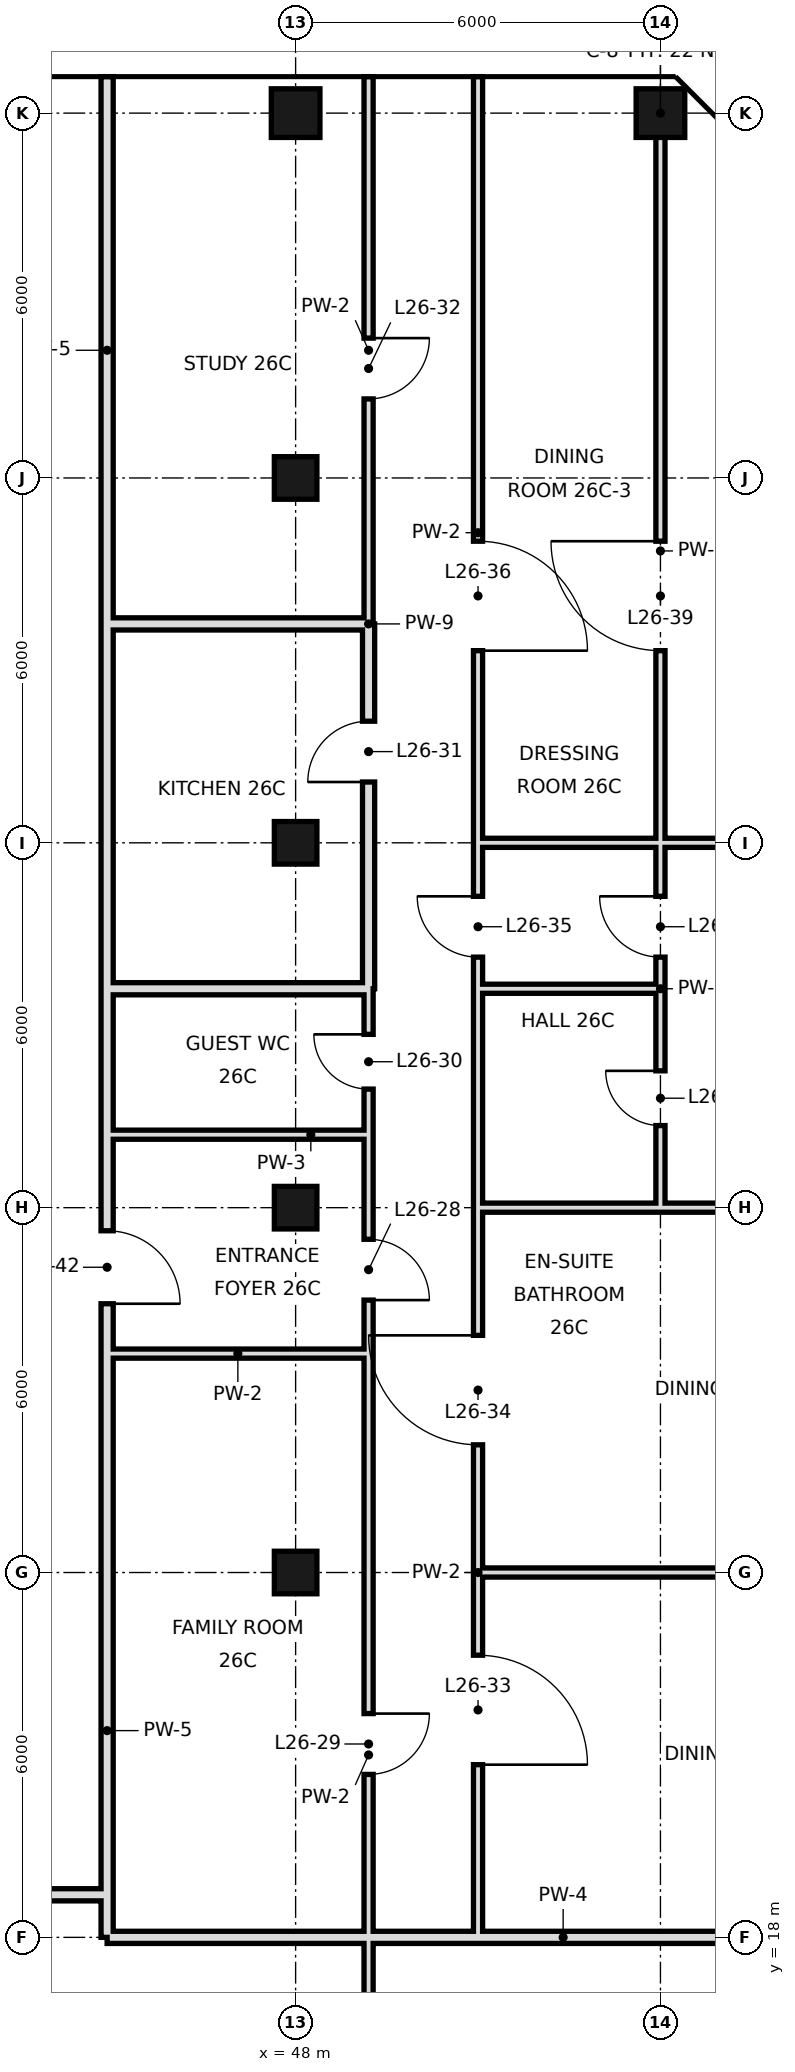
"""IFC4 building model, lengths in metres.
Left out: names, types, materials, properties, quantities, classifications, styles, units other than length and angle.
Written with IfcOpenShell. Run it as: python <this file> out.ifc"""

import sys

from ifc_helpers import new_model, si_unit, direction, frame, frame_2d, origin, origin_2d, place, context, subcontext, project, spatial, rectangle, hollow_rectangle, extrude, element, fill, save


model = new_model("IFC4")
c1 = context("Model", 3, precision=1e-05, world=origin(), true_north=direction((0.0, 1.0)))
c2 = subcontext(c1, "Body", "Model", "MODEL_VIEW")
j1 = project(units=[si_unit("LENGTHUNIT", "METRE"), si_unit("PLANEANGLEUNIT", "RADIAN")], contexts=[c1])
p1 = place(None, origin())
s1 = spatial("IfcSite", under=j1, at=p1, CompositionType="ELEMENT")
p2 = place(p1, origin())
s2 = spatial("IfcBuilding", under=s1, at=p2, CompositionType="ELEMENT")
p3 = place(p2, frame((0.0, 0.0, 119.6)))
s3 = spatial("IfcBuildingStorey", under=s2, at=p3, CompositionType="ELEMENT", Elevation=119.6)
for number, where, z_axis, x_axis in (
    (1, (48.0, 24.0, 0.0), (0.0, 0.0, 1.0), (1.0, 0.0, 0.0)),
    (2, (48.0, 30.0, 0.0), (0.0, 0.0, 1.0), (1.0, 0.0, 0.0)),
    (3, (48.0, 36.0, 0.0), (0.0, 0.0, 1.0), (1.0, 0.0, 0.0)),
    (4, (48.0, 42.0, 0.0), (0.0, 0.0, 1.0), (1.0, 0.0, 0.0)),
):
    element("IfcColumn", number, at=place(p3, frame(where, z_axis=z_axis, x_axis=x_axis)), inside=s3, PredefinedType="COLUMN", context=c2, shape_type="SweptSolid", body=[
        extrude(hollow_rectangle(XDim=0.7, YDim=0.7, WallThickness=0.036, at=origin_2d()), origin(), (0.0, 0.0, 1.0), 3.6),
    ])
for number, where, z_axis, x_axis in (
    (5, (48.0, 48.0, 0.0), (0.0, 0.0, 1.0), (1.0, 0.0, 0.0)),
    (6, (54.0, 48.0, 0.0), (0.0, 0.0, 1.0), (1.0, 0.0, 0.0)),
):
    element("IfcColumn", number, at=place(p3, frame(where, z_axis=z_axis, x_axis=x_axis)), inside=s3, PredefinedType="COLUMN", context=c2, shape_type="SweptSolid", body=[
        extrude(hollow_rectangle(XDim=0.8, YDim=0.8, WallThickness=0.04, at=origin_2d()), origin(), (0.0, 0.0, 1.0), 3.6),
    ])
p4 = place(p3, frame((44.9, 18.7, 0.0), z_axis=(0.0, 0.0, 1.0), x_axis=(0.0, 1.0, 0.0)))
e7 = element("IfcWall", 7, at=p4, inside=s3, PredefinedType="SOLIDWALL", context=c2, shape_type="SweptSolid", body=[
    extrude(rectangle(XDim=14.9, YDim=0.2, at=frame_2d((7.45, 0.0))), origin(), (0.0, 0.0, 1.0), 2.97),
])
p5 = place(p4, frame((9.72, 0.0, 0.0)))
e8 = element("IfcOpeningElement", 8, at=p5, cuts=e7, PredefinedType="OPENING", context=c2, shape_type="SweptSolid", body=[
    extrude(rectangle(XDim=1.2, YDim=2.4, at=frame_2d((0.6, 1.2))), frame((0.0, 0.11, 0.0), z_axis=(0.0, -1.0, 0.0), x_axis=(1.0, 0.0, 0.0)), (0.0, 0.0, 1.0), 0.22),
])
p6 = place(p3, frame((44.9, 39.6, 0.0), z_axis=(0.0, 0.0, 1.0), x_axis=(0.0, 1.0, 0.0)))
e9 = element("IfcWall", 9, at=p6, inside=s3, PredefinedType="SOLIDWALL", context=c2, shape_type="SweptSolid", body=[
    extrude(rectangle(XDim=9.0, YDim=0.2, at=frame_2d((4.5, 0.0))), origin(), (0.0, 0.0, 1.0), 2.72),
])
p7 = place(p3, frame((44.9, 33.6, 0.0), z_axis=(0.0, 0.0, 1.0), x_axis=(0.0, 1.0, 0.0)))
e10 = element("IfcWall", 10, at=p7, inside=s3, PredefinedType="SOLIDWALL", context=c2, shape_type="SweptSolid", body=[
    extrude(rectangle(XDim=6.0, YDim=0.2, at=frame_2d((3.0, 0.0))), origin(), (0.0, 0.0, 1.0), 3.42),
])
p8 = place(p3, frame((44.9, 18.0, 0.0), z_axis=(0.0, 0.0, 1.0), x_axis=(0.0, 1.0, 0.0)))
e11 = element("IfcWall", 11, at=p8, inside=s3, PredefinedType="SOLIDWALL", context=c2, shape_type="SweptSolid", body=[
    extrude(rectangle(XDim=0.7, YDim=0.2, at=frame_2d((0.35, 0.0))), origin(), (0.0, 0.0, 1.0), 2.97),
])
p9 = place(p3, frame((49.2, 33.6, 0.0), z_axis=(0.0, 0.0, 1.0), x_axis=(0.0, 1.0, 0.0)))
e12 = element("IfcWall", 12, at=p9, inside=s3, PredefinedType="SOLIDWALL", context=c2, shape_type="SweptSolid", body=[
    extrude(rectangle(XDim=6.0, YDim=0.2, at=frame_2d((3.0, 0.0))), origin(), (0.0, 0.0, 1.0), 2.72),
])
p10 = place(p9, frame((3.4, 0.0, 0.0)))
e13 = element("IfcOpeningElement", 13, at=p10, cuts=e12, PredefinedType="OPENING", context=c2, shape_type="SweptSolid", body=[
    extrude(rectangle(XDim=1.0, YDim=2.4, at=frame_2d((0.5, 1.2))), frame((0.0, 0.11, 0.0), z_axis=(0.0, -1.0, 0.0), x_axis=(1.0, 0.0, 0.0)), (0.0, 0.0, 1.0), 0.22),
])
p11 = place(p3, frame((49.2, 10.8, 0.0), z_axis=(0.0, 0.0, 1.0), x_axis=(0.0, 1.0, 0.0)))
e14 = element("IfcWall", 14, at=p11, inside=s3, PredefinedType="PARTITIONING", context=c2, shape_type="SweptSolid", body=[
    extrude(rectangle(XDim=20.4, YDim=0.15, at=frame_2d((10.2, 0.0))), origin(), (0.0, 0.0, 1.0), 3.42),
])
p12 = place(p11, frame((17.68, 0.0, 0.0)))
e15 = element("IfcOpeningElement", 15, at=p12, cuts=e14, PredefinedType="OPENING", context=c2, shape_type="SweptSolid", body=[
    extrude(rectangle(XDim=1.0, YDim=2.4, at=frame_2d((0.5, 1.2))), frame((0.0, 0.085, 0.0), z_axis=(0.0, -1.0, 0.0), x_axis=(1.0, 0.0, 0.0)), (0.0, 0.0, 1.0), 0.17),
])
p13 = place(p11, frame((9.88, 0.0, 0.0)))
e16 = element("IfcOpeningElement", 16, at=p13, cuts=e14, PredefinedType="OPENING", context=c2, shape_type="SweptSolid", body=[
    extrude(rectangle(XDim=1.0, YDim=2.4, at=frame_2d((0.5, 1.2))), frame((0.0, 0.085, 0.0), z_axis=(0.0, -1.0, 0.0), x_axis=(1.0, 0.0, 0.0)), (0.0, 0.0, 1.0), 0.17),
])
p14 = place(p3, frame((49.2, 39.6, 0.0), z_axis=(0.0, 0.0, 1.0), x_axis=(0.0, 1.0, 0.0)))
e17 = element("IfcWall", 17, at=p14, inside=s3, PredefinedType="PARTITIONING", context=c2, shape_type="SweptSolid", body=[
    extrude(rectangle(XDim=9.0, YDim=0.15, at=frame_2d((4.5, 0.0))), origin(), (0.0, 0.0, 1.0), 3.42),
])
p15 = place(p14, frame((3.7, 0.0, 0.0)))
e18 = element("IfcOpeningElement", 18, at=p15, cuts=e17, PredefinedType="OPENING", context=c2, shape_type="SweptSolid", body=[
    extrude(rectangle(XDim=1.0, YDim=2.4, at=frame_2d((0.5, 1.2))), frame((0.0, 0.085, 0.0), z_axis=(0.0, -1.0, 0.0), x_axis=(1.0, 0.0, 0.0)), (0.0, 0.0, 1.0), 0.17),
])
p16 = place(p3, frame((49.2, 31.2, 0.0), z_axis=(0.0, 0.0, 1.0), x_axis=(0.0, 1.0, 0.0)))
e19 = element("IfcWall", 19, at=p16, inside=s3, PredefinedType="PARTITIONING", context=c2, shape_type="SweptSolid", body=[
    extrude(rectangle(XDim=2.4, YDim=0.15, at=frame_2d((1.2, 0.0))), origin(), (0.0, 0.0, 1.0), 3.42),
])
p17 = place(p16, frame((0.75, 0.0, 0.0)))
e20 = element("IfcOpeningElement", 20, at=p17, cuts=e19, PredefinedType="OPENING", context=c2, shape_type="SweptSolid", body=[
    extrude(rectangle(XDim=0.9, YDim=2.4, at=frame_2d((0.45, 1.2))), frame((0.0, 0.085, 0.0), z_axis=(0.0, -1.0, 0.0), x_axis=(1.0, 0.0, 0.0)), (0.0, 0.0, 1.0), 0.17),
])
p18 = place(p3, frame((51.0, 18.0, 0.0), z_axis=(0.0, 0.0, 1.0), x_axis=(0.0, 1.0, 0.0)))
e21 = element("IfcWall", 21, at=p18, inside=s3, PredefinedType="PARTITIONING", context=c2, shape_type="SweptSolid", body=[
    extrude(rectangle(XDim=12.0, YDim=0.15, at=frame_2d((6.0, 0.0))), origin(), (0.0, 0.0, 1.0), 3.42),
])
p19 = place(p18, frame((2.84, 0.0, 0.0)))
e22 = element("IfcOpeningElement", 22, at=p19, cuts=e21, PredefinedType="OPENING", context=c2, shape_type="SweptSolid", body=[
    extrude(rectangle(XDim=1.8, YDim=2.4, at=frame_2d((0.9, 1.2))), frame((0.0, 0.085, 0.0), z_axis=(0.0, -1.0, 0.0), x_axis=(1.0, 0.0, 0.0)), (0.0, 0.0, 1.0), 0.17),
])
p20 = place(p18, frame((8.1, 0.0, 0.0)))
e23 = element("IfcOpeningElement", 23, at=p20, cuts=e21, PredefinedType="OPENING", context=c2, shape_type="SweptSolid", body=[
    extrude(rectangle(XDim=1.8, YDim=2.4, at=frame_2d((0.9, 1.2))), frame((0.0, 0.085, 0.0), z_axis=(0.0, -1.0, 0.0), x_axis=(1.0, 0.0, 0.0)), (0.0, 0.0, 1.0), 0.17),
])
p21 = place(p3, frame((51.0, 33.6, 0.0), z_axis=(0.0, 0.0, 1.0), x_axis=(0.0, 1.0, 0.0)))
e24 = element("IfcWall", 24, at=p21, inside=s3, PredefinedType="PARTITIONING", context=c2, shape_type="SweptSolid", body=[
    extrude(rectangle(XDim=15.0, YDim=0.15, at=frame_2d((7.5, 0.0))), origin(), (0.0, 0.0, 1.0), 3.42),
])
p22 = place(p21, frame((0.52, 0.0, 0.0)))
e25 = element("IfcOpeningElement", 25, at=p22, cuts=e24, PredefinedType="OPENING", context=c2, shape_type="SweptSolid", body=[
    extrude(rectangle(XDim=1.0, YDim=2.4, at=frame_2d((0.5, 1.2))), frame((0.0, 0.085, 0.0), z_axis=(0.0, -1.0, 0.0), x_axis=(1.0, 0.0, 0.0)), (0.0, 0.0, 1.0), 0.17),
])
p23 = place(p21, frame((5.56, 0.0, 0.0)))
e26 = element("IfcOpeningElement", 26, at=p23, cuts=e24, PredefinedType="OPENING", context=c2, shape_type="SweptSolid", body=[
    extrude(rectangle(XDim=1.8, YDim=2.4, at=frame_2d((0.9, 1.2))), frame((0.0, 0.085, 0.0), z_axis=(0.0, -1.0, 0.0), x_axis=(1.0, 0.0, 0.0)), (0.0, 0.0, 1.0), 0.17),
])
p24 = place(p3, frame((51.0, 30.0, 0.0), z_axis=(0.0, 0.0, 1.0), x_axis=(0.0, 1.0, 0.0)))
e27 = element("IfcWall", 27, at=p24, inside=s3, PredefinedType="PARTITIONING", context=c2, shape_type="SweptSolid", body=[
    extrude(rectangle(XDim=3.6, YDim=0.15, at=frame_2d((1.8, 0.0))), origin(), (0.0, 0.0, 1.0), 3.42),
])
p25 = place(p3, frame((54.0, 33.6, 0.0), z_axis=(0.0, 0.0, 1.0), x_axis=(0.0, 1.0, 0.0)))
e28 = element("IfcWall", 28, at=p25, inside=s3, PredefinedType="PARTITIONING", context=c2, shape_type="SweptSolid", body=[
    extrude(rectangle(XDim=14.4, YDim=0.15, at=frame_2d((7.2, 0.0))), origin(), (0.0, 0.0, 1.0), 3.42),
])
p26 = place(p25, frame((0.52, 0.0, 0.0)))
e29 = element("IfcOpeningElement", 29, at=p26, cuts=e28, PredefinedType="OPENING", context=c2, shape_type="SweptSolid", body=[
    extrude(rectangle(XDim=1.0, YDim=2.4, at=frame_2d((0.5, 1.2))), frame((0.0, 0.085, 0.0), z_axis=(0.0, -1.0, 0.0), x_axis=(1.0, 0.0, 0.0)), (0.0, 0.0, 1.0), 0.17),
])
p27 = place(p25, frame((5.56, 0.0, 0.0)))
e30 = element("IfcOpeningElement", 30, at=p27, cuts=e28, PredefinedType="OPENING", context=c2, shape_type="SweptSolid", body=[
    extrude(rectangle(XDim=1.8, YDim=2.4, at=frame_2d((0.9, 1.2))), frame((0.0, 0.085, 0.0), z_axis=(0.0, -1.0, 0.0), x_axis=(1.0, 0.0, 0.0)), (0.0, 0.0, 1.0), 0.17),
])
p28 = place(p3, frame((54.0, 30.0, 0.0), z_axis=(0.0, 0.0, 1.0), x_axis=(0.0, 1.0, 0.0)))
e31 = element("IfcWall", 31, at=p28, inside=s3, PredefinedType="PARTITIONING", context=c2, shape_type="SweptSolid", body=[
    extrude(rectangle(XDim=3.6, YDim=0.15, at=frame_2d((1.8, 0.0))), origin(), (0.0, 0.0, 1.0), 3.42),
])
p29 = place(p28, frame((1.35, 0.0, 0.0)))
e32 = element("IfcOpeningElement", 32, at=p29, cuts=e31, PredefinedType="OPENING", context=c2, shape_type="SweptSolid", body=[
    extrude(rectangle(XDim=0.9, YDim=2.4, at=frame_2d((0.45, 1.2))), frame((0.0, 0.085, 0.0), z_axis=(0.0, -1.0, 0.0), x_axis=(1.0, 0.0, 0.0)), (0.0, 0.0, 1.0), 0.17),
])
p30 = place(p3, frame((44.9, 18.0, 0.0), z_axis=(0.0, 0.0, 1.0), x_axis=(1.0, 0.0, 0.0)))
e33 = element("IfcWall", 33, at=p30, inside=s3, PredefinedType="SOLIDWALL", context=c2, shape_type="SweptSolid", body=[
    extrude(rectangle(XDim=15.7, YDim=0.2, at=frame_2d((7.85, 0.0))), origin(), (0.0, 0.0, 1.0), 2.72),
])
p31 = place(p3, frame((35.4, 18.7, 0.0), z_axis=(0.0, 0.0, 1.0), x_axis=(1.0, 0.0, 0.0)))
e34 = element("IfcWall", 34, at=p31, inside=s3, PredefinedType="SOLIDWALL", context=c2, shape_type="SweptSolid", body=[
    extrude(rectangle(XDim=9.5, YDim=0.2, at=frame_2d((4.75, 0.0))), origin(), (0.0, 0.0, 1.0), 2.72),
])
p32 = place(p3, frame((51.0, 24.0, 0.0), z_axis=(0.0, 0.0, 1.0), x_axis=(1.0, 0.0, 0.0)))
e35 = element("IfcWall", 35, at=p32, inside=s3, PredefinedType="PARTITIONING", context=c2, shape_type="SweptSolid", body=[
    extrude(rectangle(XDim=9.0, YDim=0.15, at=frame_2d((4.5, 0.0))), origin(), (0.0, 0.0, 1.0), 2.72),
])
p33 = place(p3, frame((44.9, 27.6, 0.0), z_axis=(0.0, 0.0, 1.0), x_axis=(1.0, 0.0, 0.0)))
e36 = element("IfcWall", 36, at=p33, inside=s3, PredefinedType="PARTITIONING", context=c2, shape_type="SweptSolid", body=[
    extrude(rectangle(XDim=4.3, YDim=0.15, at=frame_2d((2.15, 0.0))), origin(), (0.0, 0.0, 1.0), 3.42),
])
p34 = place(p3, frame((54.0, 30.0, 0.0), z_axis=(0.0, 0.0, 1.0), x_axis=(1.0, 0.0, 0.0)))
e37 = element("IfcWall", 37, at=p34, inside=s3, PredefinedType="PARTITIONING", context=c2, shape_type="SweptSolid", body=[
    extrude(rectangle(XDim=6.6, YDim=0.15, at=frame_2d((3.3, 0.0))), origin(), (0.0, 0.0, 1.0), 2.72),
])
p35 = place(p3, frame((51.0, 30.0, 0.0), z_axis=(0.0, 0.0, 1.0), x_axis=(1.0, 0.0, 0.0)))
e38 = element("IfcWall", 38, at=p35, inside=s3, PredefinedType="PARTITIONING", context=c2, shape_type="SweptSolid", body=[
    extrude(rectangle(XDim=3.0, YDim=0.15, at=frame_2d((1.5, 0.0))), origin(), (0.0, 0.0, 1.0), 2.72),
])
p36 = place(p3, frame((44.9, 31.2, 0.0), z_axis=(0.0, 0.0, 1.0), x_axis=(1.0, 0.0, 0.0)))
e39 = element("IfcWall", 39, at=p36, inside=s3, PredefinedType="PARTITIONING", context=c2, shape_type="SweptSolid", body=[
    extrude(rectangle(XDim=4.3, YDim=0.15, at=frame_2d((2.15, 0.0))), origin(), (0.0, 0.0, 1.0), 3.42),
])
p37 = place(p3, frame((44.9, 33.6, 0.0), z_axis=(0.0, 0.0, 1.0), x_axis=(1.0, 0.0, 0.0)))
e40 = element("IfcWall", 40, at=p37, inside=s3, PredefinedType="SOLIDWALL", context=c2, shape_type="SweptSolid", body=[
    extrude(rectangle(XDim=4.3, YDim=0.2, at=frame_2d((2.15, 0.0))), origin(), (0.0, 0.0, 1.0), 2.97),
])
p38 = place(p3, frame((51.0, 33.6, 0.0), z_axis=(0.0, 0.0, 1.0), x_axis=(1.0, 0.0, 0.0)))
e41 = element("IfcWall", 41, at=p38, inside=s3, PredefinedType="PARTITIONING", context=c2, shape_type="SweptSolid", body=[
    extrude(rectangle(XDim=3.0, YDim=0.15, at=frame_2d((1.5, 0.0))), origin(), (0.0, 0.0, 1.0), 3.42),
])
p39 = place(p3, frame((51.0, 36.0, 0.0), z_axis=(0.0, 0.0, 1.0), x_axis=(1.0, 0.0, 0.0)))
e42 = element("IfcWall", 42, at=p39, inside=s3, PredefinedType="PARTITIONING", context=c2, shape_type="SweptSolid", body=[
    extrude(rectangle(XDim=9.0, YDim=0.15, at=frame_2d((4.5, 0.0))), origin(), (0.0, 0.0, 1.0), 2.72),
])
p40 = place(p3, frame((44.9, 39.6, 0.0), z_axis=(0.0, 0.0, 1.0), x_axis=(1.0, 0.0, 0.0)))
e43 = element("IfcWall", 43, at=p40, inside=s3, PredefinedType="SOLIDWALL", context=c2, shape_type="SweptSolid", body=[
    extrude(rectangle(XDim=4.3, YDim=0.2, at=frame_2d((2.15, 0.0))), origin(), (0.0, 0.0, 1.0), 2.97),
])
p41 = place(p12, frame((1.0, 0.0, 0.0), z_axis=(0.0, 0.0, 1.0), x_axis=(-1.0, 0.0, 0.0)))
e44 = element("IfcDoor", 44, at=p41, inside=s3, OperationType="SINGLE_SWING_RIGHT", PredefinedType="DOOR", context=c2, shape_type="SweptSolid", body=[
    extrude(rectangle(XDim=1.0, YDim=2.4, at=frame_2d((0.5, 1.2))), frame((0.0, 0.025, 0.0), z_axis=(0.0, -1.0, 0.0), x_axis=(1.0, 0.0, 0.0)), (0.0, 0.0, 1.0), 0.05),
])
fill(e15, e44)
p42 = place(p13, origin())
e45 = element("IfcDoor", 45, at=p42, inside=s3, OperationType="SINGLE_SWING_RIGHT", PredefinedType="DOOR", context=c2, shape_type="SweptSolid", body=[
    extrude(rectangle(XDim=1.0, YDim=2.4, at=frame_2d((0.5, 1.2))), frame((0.0, 0.025, 0.0), z_axis=(0.0, -1.0, 0.0), x_axis=(1.0, 0.0, 0.0)), (0.0, 0.0, 1.0), 0.05),
])
fill(e16, e45)
p43 = place(p17, frame((0.9, 0.0, 0.0), z_axis=(0.0, 0.0, 1.0), x_axis=(-1.0, 0.0, 0.0)))
e46 = element("IfcDoor", 46, at=p43, inside=s3, OperationType="SINGLE_SWING_LEFT", PredefinedType="DOOR", context=c2, shape_type="SweptSolid", body=[
    extrude(rectangle(XDim=0.9, YDim=2.4, at=frame_2d((0.45, 1.2))), frame((0.0, 0.025, 0.0), z_axis=(0.0, -1.0, 0.0), x_axis=(1.0, 0.0, 0.0)), (0.0, 0.0, 1.0), 0.05),
])
fill(e20, e46)
p44 = place(p10, origin())
e47 = element("IfcDoor", 47, at=p44, inside=s3, OperationType="SINGLE_SWING_LEFT", PredefinedType="DOOR", context=c2, shape_type="SweptSolid", body=[
    extrude(rectangle(XDim=1.0, YDim=2.4, at=frame_2d((0.5, 1.2))), frame((0.0, 0.025, 0.0), z_axis=(0.0, -1.0, 0.0), x_axis=(1.0, 0.0, 0.0)), (0.0, 0.0, 1.0), 0.05),
])
fill(e13, e47)
p45 = place(p15, origin())
e48 = element("IfcDoor", 48, at=p45, inside=s3, OperationType="SINGLE_SWING_RIGHT", PredefinedType="DOOR", context=c2, shape_type="SweptSolid", body=[
    extrude(rectangle(XDim=1.0, YDim=2.4, at=frame_2d((0.5, 1.2))), frame((0.0, 0.025, 0.0), z_axis=(0.0, -1.0, 0.0), x_axis=(1.0, 0.0, 0.0)), (0.0, 0.0, 1.0), 0.05),
])
fill(e18, e48)
p46 = place(p19, frame((1.8, 0.0, 0.0), z_axis=(0.0, 0.0, 1.0), x_axis=(-1.0, 0.0, 0.0)))
e49 = element("IfcDoor", 49, at=p46, inside=s3, OperationType="SINGLE_SWING_RIGHT", PredefinedType="DOOR", context=c2, shape_type="SweptSolid", body=[
    extrude(rectangle(XDim=1.8, YDim=2.4, at=frame_2d((0.9, 1.2))), frame((0.0, 0.025, 0.0), z_axis=(0.0, -1.0, 0.0), x_axis=(1.0, 0.0, 0.0)), (0.0, 0.0, 1.0), 0.05),
])
fill(e22, e49)
p47 = place(p20, frame((1.8, 0.0, 0.0), z_axis=(0.0, 0.0, 1.0), x_axis=(-1.0, 0.0, 0.0)))
e50 = element("IfcDoor", 50, at=p47, inside=s3, OperationType="SINGLE_SWING_LEFT", PredefinedType="DOOR", context=c2, shape_type="SweptSolid", body=[
    extrude(rectangle(XDim=1.8, YDim=2.4, at=frame_2d((0.9, 1.2))), frame((0.0, 0.025, 0.0), z_axis=(0.0, -1.0, 0.0), x_axis=(1.0, 0.0, 0.0)), (0.0, 0.0, 1.0), 0.05),
])
fill(e23, e50)
p48 = place(p22, frame((1.0, 0.0, 0.0), z_axis=(0.0, 0.0, 1.0), x_axis=(-1.0, 0.0, 0.0)))
e51 = element("IfcDoor", 51, at=p48, inside=s3, OperationType="SINGLE_SWING_LEFT", PredefinedType="DOOR", context=c2, shape_type="SweptSolid", body=[
    extrude(rectangle(XDim=1.0, YDim=2.4, at=frame_2d((0.5, 1.2))), frame((0.0, 0.025, 0.0), z_axis=(0.0, -1.0, 0.0), x_axis=(1.0, 0.0, 0.0)), (0.0, 0.0, 1.0), 0.05),
])
fill(e25, e51)
p49 = place(p23, frame((1.8, 0.0, 0.0), z_axis=(0.0, 0.0, 1.0), x_axis=(-1.0, 0.0, 0.0)))
e52 = element("IfcDoor", 52, at=p49, inside=s3, OperationType="SINGLE_SWING_RIGHT", PredefinedType="DOOR", context=c2, shape_type="SweptSolid", body=[
    extrude(rectangle(XDim=1.8, YDim=2.4, at=frame_2d((0.9, 1.2))), frame((0.0, 0.025, 0.0), z_axis=(0.0, -1.0, 0.0), x_axis=(1.0, 0.0, 0.0)), (0.0, 0.0, 1.0), 0.05),
])
fill(e26, e52)
p50 = place(p26, frame((1.0, 0.0, 0.0), z_axis=(0.0, 0.0, 1.0), x_axis=(-1.0, 0.0, 0.0)))
e53 = element("IfcDoor", 53, at=p50, inside=s3, OperationType="SINGLE_SWING_LEFT", PredefinedType="DOOR", context=c2, shape_type="SweptSolid", body=[
    extrude(rectangle(XDim=1.0, YDim=2.4, at=frame_2d((0.5, 1.2))), frame((0.0, 0.025, 0.0), z_axis=(0.0, -1.0, 0.0), x_axis=(1.0, 0.0, 0.0)), (0.0, 0.0, 1.0), 0.05),
])
fill(e29, e53)
p51 = place(p29, frame((0.9, 0.0, 0.0), z_axis=(0.0, 0.0, 1.0), x_axis=(-1.0, 0.0, 0.0)))
e54 = element("IfcDoor", 54, at=p51, inside=s3, OperationType="SINGLE_SWING_LEFT", PredefinedType="DOOR", context=c2, shape_type="SweptSolid", body=[
    extrude(rectangle(XDim=0.9, YDim=2.4, at=frame_2d((0.45, 1.2))), frame((0.0, 0.025, 0.0), z_axis=(0.0, -1.0, 0.0), x_axis=(1.0, 0.0, 0.0)), (0.0, 0.0, 1.0), 0.05),
])
fill(e32, e54)
p52 = place(p27, frame((1.8, 0.0, 0.0), z_axis=(0.0, 0.0, 1.0), x_axis=(-1.0, 0.0, 0.0)))
e55 = element("IfcDoor", 55, at=p52, inside=s3, OperationType="SINGLE_SWING_LEFT", PredefinedType="DOOR", context=c2, shape_type="SweptSolid", body=[
    extrude(rectangle(XDim=1.8, YDim=2.4, at=frame_2d((0.9, 1.2))), frame((0.0, 0.025, 0.0), z_axis=(0.0, -1.0, 0.0), x_axis=(1.0, 0.0, 0.0)), (0.0, 0.0, 1.0), 0.05),
])
fill(e30, e55)
p53 = place(p5, frame((1.2, 0.0, 0.0), z_axis=(0.0, 0.0, 1.0), x_axis=(-1.0, 0.0, 0.0)))
e56 = element("IfcDoor", 56, at=p53, inside=s3, OperationType="SINGLE_SWING_RIGHT", PredefinedType="DOOR", context=c2, shape_type="SweptSolid", body=[
    extrude(rectangle(XDim=1.2, YDim=2.4, at=frame_2d((0.6, 1.2))), frame((0.0, 0.025, 0.0), z_axis=(0.0, -1.0, 0.0), x_axis=(1.0, 0.0, 0.0)), (0.0, 0.0, 1.0), 0.05),
])
fill(e8, e56)
save(model, sys.argv[1])
